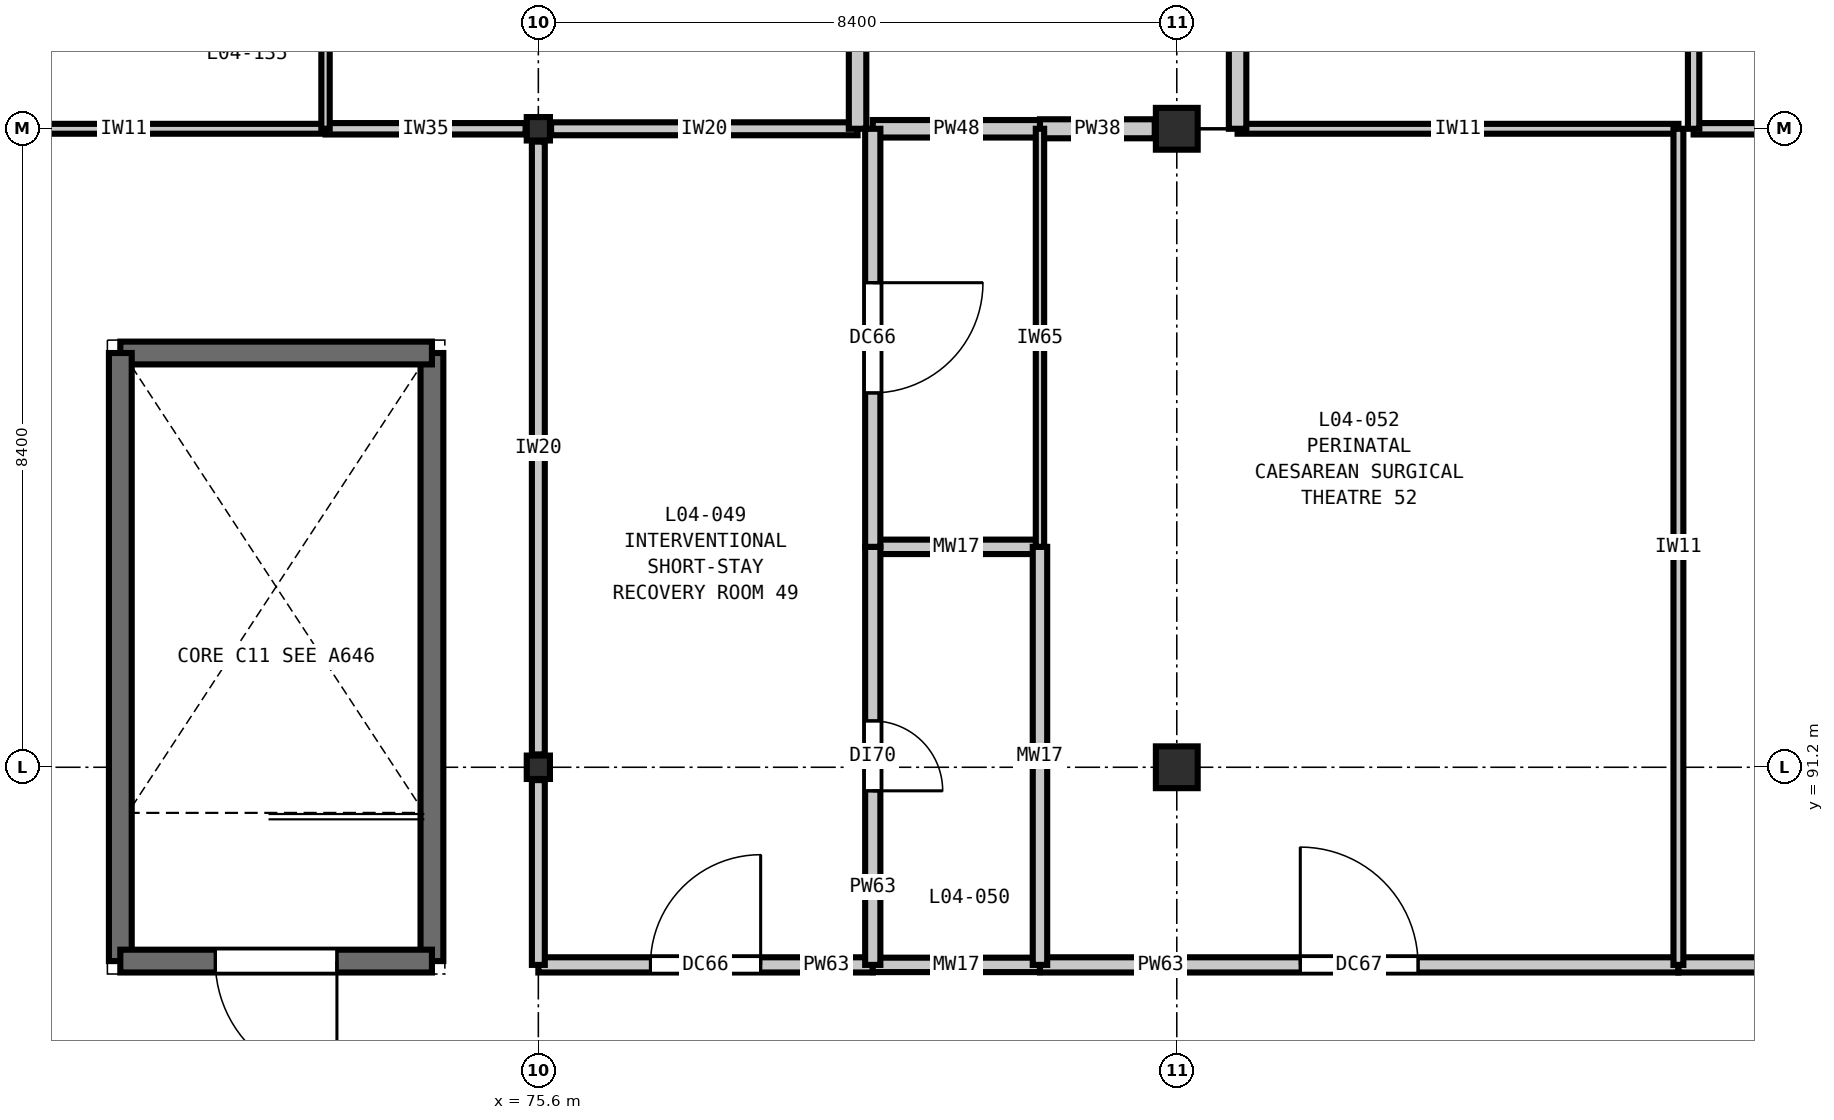
"""IFC4 building model, lengths in metres.
Left out: names, types, materials, properties, quantities, classifications, styles, units other than length and angle.
Written with IfcOpenShell. Run it as: python <this file> out.ifc"""

import sys

from ifc_helpers import new_model, si_unit, direction, frame, frame_2d, origin, origin_2d, place, context, subcontext, project, spatial, rectangle, i_section, extrude, element, fill, save


model = new_model("IFC4")
c1 = context("Model", 3, precision=1e-05, world=origin(), true_north=direction((0.0, 1.0)))
c2 = subcontext(c1, "Body", "Model", "MODEL_VIEW")
j1 = project(units=[si_unit("LENGTHUNIT", "METRE"), si_unit("PLANEANGLEUNIT", "RADIAN")], contexts=[c1])
p1 = place(None, origin())
s1 = spatial("IfcSite", under=j1, at=p1, CompositionType="ELEMENT")
p2 = place(p1, origin())
s2 = spatial("IfcBuilding", under=s1, at=p2, CompositionType="ELEMENT")
p3 = place(p2, frame((0.0, 0.0, 20.4)))
s3 = spatial("IfcBuildingStorey", under=s2, at=p3, CompositionType="ELEMENT", Elevation=20.4)
for number, where, z_axis, x_axis in (
    (1, (75.6, 91.2, 0.0), (0.0, 0.0, 1.0), (1.0, 0.0, 0.0)),
    (2, (75.6, 99.6, 0.0), (0.0, 0.0, 1.0), (1.0, 0.0, 0.0)),
):
    element("IfcColumn", number, at=place(p3, frame(where, z_axis=z_axis, x_axis=x_axis)), inside=s3, PredefinedType="COLUMN", context=c2, shape_type="SweptSolid", body=[
        extrude(i_section(OverallWidth=0.305, OverallDepth=0.308, WebThickness=0.01, FlangeThickness=0.015, FilletRadius=0.015, at=origin_2d()), origin(), (0.0, 0.0, 1.0), 4.2),
    ])
for number, where, z_axis, x_axis in (
    (3, (84.0, 91.2, 0.0), (0.0, 0.0, 1.0), (1.0, 0.0, 0.0)),
    (4, (84.0, 99.6, 0.0), (0.0, 0.0, 1.0), (1.0, 0.0, 0.0)),
):
    element("IfcColumn", number, at=place(p3, frame(where, z_axis=z_axis, x_axis=x_axis)), inside=s3, PredefinedType="COLUMN", context=c2, shape_type="SweptSolid", body=[
        extrude(rectangle(XDim=0.55, YDim=0.55, at=origin_2d()), origin(), (0.0, 0.0, 1.0), 4.2),
    ])
p4 = place(p3, frame((74.2, 88.65, 0.0), z_axis=(0.0, 0.0, 1.0), x_axis=(0.0, 1.0, 0.0)))
e5 = element("IfcWall", 5, at=p4, inside=s3, PredefinedType="SHEAR", context=c2, shape_type="SweptSolid", body=[
    extrude(rectangle(XDim=8.0, YDim=0.3, at=frame_2d((4.0, 0.0))), origin(), (0.0, 0.0, 1.0), 4.2),
])
p5 = place(p3, frame((74.2, 96.65, 0.0), z_axis=(0.0, 0.0, 1.0), x_axis=(-1.0, 0.0, 0.0)))
e6 = element("IfcWall", 6, at=p5, inside=s3, PredefinedType="SHEAR", context=c2, shape_type="SweptSolid", body=[
    extrude(rectangle(XDim=4.1, YDim=0.3, at=frame_2d((2.05, 0.0))), origin(), (0.0, 0.0, 1.0), 4.2),
])
p6 = place(p3, frame((70.1, 96.65, 0.0), z_axis=(0.0, 0.0, 1.0), x_axis=(0.0, -1.0, 0.0)))
e7 = element("IfcWall", 7, at=p6, inside=s3, PredefinedType="SHEAR", context=c2, shape_type="SweptSolid", body=[
    extrude(rectangle(XDim=8.0, YDim=0.3, at=frame_2d((4.0, 0.0))), origin(), (0.0, 0.0, 1.0), 4.2),
])
p7 = place(p3, frame((70.1, 88.65, 0.0), z_axis=(0.0, 0.0, 1.0), x_axis=(1.0, 0.0, 0.0)))
e8 = element("IfcWall", 8, at=p7, inside=s3, PredefinedType="SHEAR", context=c2, shape_type="SweptSolid", body=[
    extrude(rectangle(XDim=4.1, YDim=0.3, at=frame_2d((2.05, 0.0))), origin(), (0.0, 0.0, 1.0), 4.2),
])
p8 = place(p7, frame((1.25, 0.0, 0.0)))
e9 = element("IfcOpeningElement", 9, at=p8, cuts=e8, PredefinedType="OPENING", context=c2, shape_type="SweptSolid", body=[
    extrude(rectangle(XDim=1.6, YDim=2.25, at=frame_2d((0.8, 1.125))), frame((0.0, 0.16, 0.0), z_axis=(0.0, -1.0, 0.0), x_axis=(1.0, 0.0, 0.0)), (0.0, 0.0, 1.0), 0.32),
])
p9 = place(p3, frame((75.6, 88.6, 0.0), z_axis=(0.0, 0.0, 1.0), x_axis=(1.0, 0.0, 0.0)))
e10 = element("IfcWall", 10, at=p9, inside=s3, PredefinedType="PARTITIONING", context=c2, shape_type="SweptSolid", body=[
    extrude(rectangle(XDim=4.4, YDim=0.2, at=frame_2d((2.2, 0.0))), origin(), (0.0, 0.0, 1.0), 3.82),
])
p10 = place(p9, frame((1.475, 0.0, 0.0)))
e11 = element("IfcOpeningElement", 11, at=p10, cuts=e10, PredefinedType="OPENING", context=c2, shape_type="SweptSolid", body=[
    extrude(rectangle(XDim=1.45, YDim=2.25, at=frame_2d((0.725, 1.125))), frame((0.0, 0.11, 0.0), z_axis=(0.0, -1.0, 0.0), x_axis=(1.0, 0.0, 0.0)), (0.0, 0.0, 1.0), 0.22),
])
p11 = place(p3, frame((80.0, 88.6, 0.0), z_axis=(0.0, 0.0, 1.0), x_axis=(1.0, 0.0, 0.0)))
e12 = element("IfcWall", 12, at=p11, inside=s3, PredefinedType="PLUMBINGWALL", context=c2, shape_type="SweptSolid", body=[
    extrude(rectangle(XDim=2.2, YDim=0.19, at=frame_2d((1.1, 0.0))), origin(), (0.0, 0.0, 1.0), 3.82),
])
p12 = place(p3, frame((82.2, 88.6, 0.0), z_axis=(0.0, 0.0, 1.0), x_axis=(1.0, 0.0, 0.0)))
e13 = element("IfcWall", 13, at=p12, inside=s3, PredefinedType="PARTITIONING", context=c2, shape_type="SweptSolid", body=[
    extrude(rectangle(XDim=8.4, YDim=0.2, at=frame_2d((4.2, 0.0))), origin(), (0.0, 0.0, 1.0), 3.82),
])
p13 = place(p12, frame((3.425, 0.0, 0.0)))
e14 = element("IfcOpeningElement", 14, at=p13, cuts=e13, PredefinedType="OPENING", context=c2, shape_type="SweptSolid", body=[
    extrude(rectangle(XDim=1.55, YDim=2.25, at=frame_2d((0.775, 1.125))), frame((0.0, 0.11, 0.0), z_axis=(0.0, -1.0, 0.0), x_axis=(1.0, 0.0, 0.0)), (0.0, 0.0, 1.0), 0.22),
])
p14 = place(p3, frame((90.6, 88.6, 0.0), z_axis=(0.0, 0.0, 1.0), x_axis=(1.0, 0.0, 0.0)))
e15 = element("IfcWall", 15, at=p14, inside=s3, PredefinedType="PARTITIONING", context=c2, shape_type="SweptSolid", body=[
    extrude(rectangle(XDim=4.4, YDim=0.2, at=frame_2d((2.2, 0.0))), origin(), (0.0, 0.0, 1.0), 3.82),
])
p15 = place(p14, frame((1.35, 0.0, 0.0)))
e16 = element("IfcOpeningElement", 16, at=p15, cuts=e15, PredefinedType="OPENING", context=c2, shape_type="SweptSolid", body=[
    extrude(rectangle(XDim=1.7, YDim=2.3, at=frame_2d((0.85, 1.15))), frame((0.0, 0.11, 0.0), z_axis=(0.0, -1.0, 0.0), x_axis=(1.0, 0.0, 0.0)), (0.0, 0.0, 1.0), 0.22),
])
p16 = place(p3, frame((80.0, 94.1, 0.0), z_axis=(0.0, 0.0, 1.0), x_axis=(1.0, 0.0, 0.0)))
e17 = element("IfcWall", 17, at=p16, inside=s3, PredefinedType="PLUMBINGWALL", context=c2, shape_type="SweptSolid", body=[
    extrude(rectangle(XDim=2.2, YDim=0.19, at=frame_2d((1.1, 0.0))), origin(), (0.0, 0.0, 1.0), 3.82),
])
p17 = place(p3, frame((67.49, 99.6, 0.0), z_axis=(0.0, 0.0, 1.0), x_axis=(1.0, 0.0, 0.0)))
e18 = element("IfcWall", 18, at=p17, inside=s3, PredefinedType="PARTITIONING", context=c2, shape_type="SweptSolid", body=[
    extrude(rectangle(XDim=5.31, YDim=0.13, at=frame_2d((2.655, 0.0))), origin(), (0.0, 0.0, 1.0), 3.585),
])
p18 = place(p3, frame((72.8, 99.6, 0.0), z_axis=(0.0, 0.0, 1.0), x_axis=(1.0, 0.0, 0.0)))
e19 = element("IfcWall", 19, at=p18, inside=s3, PredefinedType="PARTITIONING", context=c2, shape_type="SweptSolid", body=[
    extrude(rectangle(XDim=2.633, YDim=0.15, at=frame_2d((1.316, 0.0))), origin(), (0.0, 0.0, 1.0), 3.585),
])
p19 = place(p3, frame((75.768, 99.6, 0.0), z_axis=(0.0, 0.0, 1.0), x_axis=(1.0, 0.0, 0.0)))
e20 = element("IfcWall", 20, at=p19, inside=s3, PredefinedType="PARTITIONING", context=c2, shape_type="SweptSolid", body=[
    extrude(rectangle(XDim=4.032, YDim=0.17, at=frame_2d((2.016, 0.0))), origin(), (0.0, 0.0, 1.0), 3.585),
])
p20 = place(p3, frame((80.0, 99.6, 0.0), z_axis=(0.0, 0.0, 1.0), x_axis=(1.0, 0.0, 0.0)))
e21 = element("IfcWall", 21, at=p20, inside=s3, PredefinedType="PARTITIONING", context=c2, shape_type="SweptSolid", body=[
    extrude(rectangle(XDim=2.2, YDim=0.23, at=frame_2d((1.1, 0.0))), origin(), (0.0, 0.0, 1.0), 3.585),
])
p21 = place(p3, frame((82.2, 99.6, 0.0), z_axis=(0.0, 0.0, 1.0), x_axis=(1.0, 0.0, 0.0)))
e22 = element("IfcWall", 22, at=p21, inside=s3, PredefinedType="PARTITIONING", context=c2, shape_type="SweptSolid", body=[
    extrude(rectangle(XDim=1.51, YDim=0.25, at=frame_2d((0.755, 0.0))), origin(), (0.0, 0.0, 1.0), 3.585),
])
p22 = place(p3, frame((84.8, 99.6, 0.0), z_axis=(0.0, 0.0, 1.0), x_axis=(1.0, 0.0, 0.0)))
e23 = element("IfcWall", 23, at=p22, inside=s3, PredefinedType="PARTITIONING", context=c2, shape_type="SweptSolid", body=[
    extrude(rectangle(XDim=5.8, YDim=0.13, at=frame_2d((2.9, 0.0))), origin(), (0.0, 0.0, 1.0), 3.585),
])
p23 = place(p3, frame((90.8, 99.6, 0.0), z_axis=(0.0, 0.0, 1.0), x_axis=(1.0, 0.0, 0.0)))
e24 = element("IfcWall", 24, at=p23, inside=s3, PredefinedType="PARTITIONING", context=c2, shape_type="SweptSolid", body=[
    extrude(rectangle(XDim=1.432, YDim=0.15, at=frame_2d((0.716, 0.0))), origin(), (0.0, 0.0, 1.0), 3.585),
])
p24 = place(p3, frame((72.8, 99.6, 0.0), z_axis=(0.0, 0.0, 1.0), x_axis=(0.0, 1.0, 0.0)))
e25 = element("IfcWall", 25, at=p24, inside=s3, PredefinedType="PARTITIONING", context=c2, shape_type="SweptSolid", body=[
    extrude(rectangle(XDim=3.6, YDim=0.11, at=frame_2d((1.8, 0.0))), origin(), (0.0, 0.0, 1.0), 3.82),
])
p25 = place(p3, frame((75.6, 91.369, 0.0), z_axis=(0.0, 0.0, 1.0), x_axis=(0.0, 1.0, 0.0)))
e26 = element("IfcWall", 26, at=p25, inside=s3, PredefinedType="PARTITIONING", context=c2, shape_type="SweptSolid", body=[
    extrude(rectangle(XDim=8.062, YDim=0.17, at=frame_2d((4.031, 0.0))), origin(), (0.0, 0.0, 1.0), 3.412),
])
p26 = place(p3, frame((75.6, 88.6, 0.0), z_axis=(0.0, 0.0, 1.0), x_axis=(0.0, 1.0, 0.0)))
e27 = element("IfcWall", 27, at=p26, inside=s3, PredefinedType="PARTITIONING", context=c2, shape_type="SweptSolid", body=[
    extrude(rectangle(XDim=2.431, YDim=0.17, at=frame_2d((1.215, 0.0))), origin(), (0.0, 0.0, 1.0), 3.412),
])
p27 = place(p3, frame((79.8, 99.6, 0.0), z_axis=(0.0, 0.0, 1.0), x_axis=(0.0, 1.0, 0.0)))
e28 = element("IfcWall", 28, at=p27, inside=s3, PredefinedType="PARTITIONING", context=c2, shape_type="SweptSolid", body=[
    extrude(rectangle(XDim=3.6, YDim=0.23, at=frame_2d((1.8, 0.0))), origin(), (0.0, 0.0, 1.0), 3.82),
])
p28 = place(p3, frame((80.0, 88.6, 0.0), z_axis=(0.0, 0.0, 1.0), x_axis=(0.0, 1.0, 0.0)))
e29 = element("IfcWall", 29, at=p28, inside=s3, PredefinedType="PARTITIONING", context=c2, shape_type="SweptSolid", body=[
    extrude(rectangle(XDim=5.5, YDim=0.2, at=frame_2d((2.75, 0.0))), origin(), (0.0, 0.0, 1.0), 3.82),
])
p29 = place(p28, frame((2.29, 0.0, 0.0)))
e30 = element("IfcOpeningElement", 30, at=p29, cuts=e29, PredefinedType="OPENING", context=c2, shape_type="SweptSolid", body=[
    extrude(rectangle(XDim=0.92, YDim=2.1, at=frame_2d((0.46, 1.05))), frame((0.0, 0.11, 0.0), z_axis=(0.0, -1.0, 0.0), x_axis=(1.0, 0.0, 0.0)), (0.0, 0.0, 1.0), 0.22),
])
p30 = place(p3, frame((80.0, 94.1, 0.0), z_axis=(0.0, 0.0, 1.0), x_axis=(0.0, 1.0, 0.0)))
e31 = element("IfcWall", 31, at=p30, inside=s3, PredefinedType="PARTITIONING", context=c2, shape_type="SweptSolid", body=[
    extrude(rectangle(XDim=5.5, YDim=0.2, at=frame_2d((2.75, 0.0))), origin(), (0.0, 0.0, 1.0), 3.82),
])
p31 = place(p30, frame((2.025, 0.0, 0.0)))
e32 = element("IfcOpeningElement", 32, at=p31, cuts=e31, PredefinedType="OPENING", context=c2, shape_type="SweptSolid", body=[
    extrude(rectangle(XDim=1.45, YDim=2.25, at=frame_2d((0.725, 1.125))), frame((0.0, 0.11, 0.0), z_axis=(0.0, -1.0, 0.0), x_axis=(1.0, 0.0, 0.0)), (0.0, 0.0, 1.0), 0.22),
])
p32 = place(p3, frame((82.2, 88.6, 0.0), z_axis=(0.0, 0.0, 1.0), x_axis=(0.0, 1.0, 0.0)))
e33 = element("IfcWall", 33, at=p32, inside=s3, PredefinedType="PLUMBINGWALL", context=c2, shape_type="SweptSolid", body=[
    extrude(rectangle(XDim=5.5, YDim=0.19, at=frame_2d((2.75, 0.0))), origin(), (0.0, 0.0, 1.0), 3.82),
])
p33 = place(p3, frame((82.2, 94.1, 0.0), z_axis=(0.0, 0.0, 1.0), x_axis=(0.0, 1.0, 0.0)))
e34 = element("IfcWall", 34, at=p33, inside=s3, PredefinedType="PARTITIONING", context=c2, shape_type="SweptSolid", body=[
    extrude(rectangle(XDim=5.5, YDim=0.11, at=frame_2d((2.75, 0.0))), origin(), (0.0, 0.0, 1.0), 3.82),
])
p34 = place(p3, frame((84.8, 99.6, 0.0), z_axis=(0.0, 0.0, 1.0), x_axis=(0.0, 1.0, 0.0)))
e35 = element("IfcWall", 35, at=p34, inside=s3, PredefinedType="PARTITIONING", context=c2, shape_type="SweptSolid", body=[
    extrude(rectangle(XDim=3.6, YDim=0.23, at=frame_2d((1.8, 0.0))), origin(), (0.0, 0.0, 1.0), 3.82),
])
p35 = place(p3, frame((90.6, 88.6, 0.0), z_axis=(0.0, 0.0, 1.0), x_axis=(0.0, 1.0, 0.0)))
e36 = element("IfcWall", 36, at=p35, inside=s3, PredefinedType="PARTITIONING", context=c2, shape_type="SweptSolid", body=[
    extrude(rectangle(XDim=11.0, YDim=0.13, at=frame_2d((5.5, 0.0))), origin(), (0.0, 0.0, 1.0), 3.82),
])
p36 = place(p3, frame((90.8, 99.6, 0.0), z_axis=(0.0, 0.0, 1.0), x_axis=(0.0, 1.0, 0.0)))
e37 = element("IfcWall", 37, at=p36, inside=s3, PredefinedType="PARTITIONING", context=c2, shape_type="SweptSolid", body=[
    extrude(rectangle(XDim=3.6, YDim=0.15, at=frame_2d((1.8, 0.0))), origin(), (0.0, 0.0, 1.0), 3.82),
])
p37 = place(p8, frame((1.6, 0.0, 0.0), z_axis=(0.0, 0.0, 1.0), x_axis=(-1.0, 0.0, 0.0)))
e38 = element("IfcDoor", 38, at=p37, inside=s3, OperationType="SINGLE_SWING_LEFT", PredefinedType="DOOR", context=c2, shape_type="SweptSolid", body=[
    extrude(rectangle(XDim=1.6, YDim=2.25, at=frame_2d((0.8, 1.125))), frame((0.0, 0.025, 0.0), z_axis=(0.0, -1.0, 0.0), x_axis=(1.0, 0.0, 0.0)), (0.0, 0.0, 1.0), 0.05),
])
fill(e9, e38)
p38 = place(p10, origin())
e39 = element("IfcDoor", 39, at=p38, inside=s3, OperationType="SINGLE_SWING_RIGHT", PredefinedType="DOOR", context=c2, shape_type="SweptSolid", body=[
    extrude(rectangle(XDim=1.45, YDim=2.25, at=frame_2d((0.725, 1.125))), frame((0.0, 0.025, 0.0), z_axis=(0.0, -1.0, 0.0), x_axis=(1.0, 0.0, 0.0)), (0.0, 0.0, 1.0), 0.05),
])
fill(e11, e39)
p39 = place(p13, origin())
e40 = element("IfcDoor", 40, at=p39, inside=s3, OperationType="SINGLE_SWING_LEFT", PredefinedType="DOOR", context=c2, shape_type="SweptSolid", body=[
    extrude(rectangle(XDim=1.55, YDim=2.25, at=frame_2d((0.775, 1.125))), frame((0.0, 0.025, 0.0), z_axis=(0.0, -1.0, 0.0), x_axis=(1.0, 0.0, 0.0)), (0.0, 0.0, 1.0), 0.05),
])
fill(e14, e40)
p40 = place(p29, frame((0.92, 0.0, 0.0), z_axis=(0.0, 0.0, 1.0), x_axis=(-1.0, 0.0, 0.0)))
e41 = element("IfcDoor", 41, at=p40, inside=s3, OperationType="SINGLE_SWING_RIGHT", PredefinedType="DOOR", context=c2, shape_type="SweptSolid", body=[
    extrude(rectangle(XDim=0.92, YDim=2.1, at=frame_2d((0.46, 1.05))), frame((0.0, 0.025, 0.0), z_axis=(0.0, -1.0, 0.0), x_axis=(1.0, 0.0, 0.0)), (0.0, 0.0, 1.0), 0.05),
])
fill(e30, e41)
p41 = place(p31, frame((1.45, 0.0, 0.0), z_axis=(0.0, 0.0, 1.0), x_axis=(-1.0, 0.0, 0.0)))
e42 = element("IfcDoor", 42, at=p41, inside=s3, OperationType="SINGLE_SWING_LEFT", PredefinedType="DOOR", context=c2, shape_type="SweptSolid", body=[
    extrude(rectangle(XDim=1.45, YDim=2.25, at=frame_2d((0.725, 1.125))), frame((0.0, 0.025, 0.0), z_axis=(0.0, -1.0, 0.0), x_axis=(1.0, 0.0, 0.0)), (0.0, 0.0, 1.0), 0.05),
])
fill(e32, e42)
save(model, sys.argv[1])
